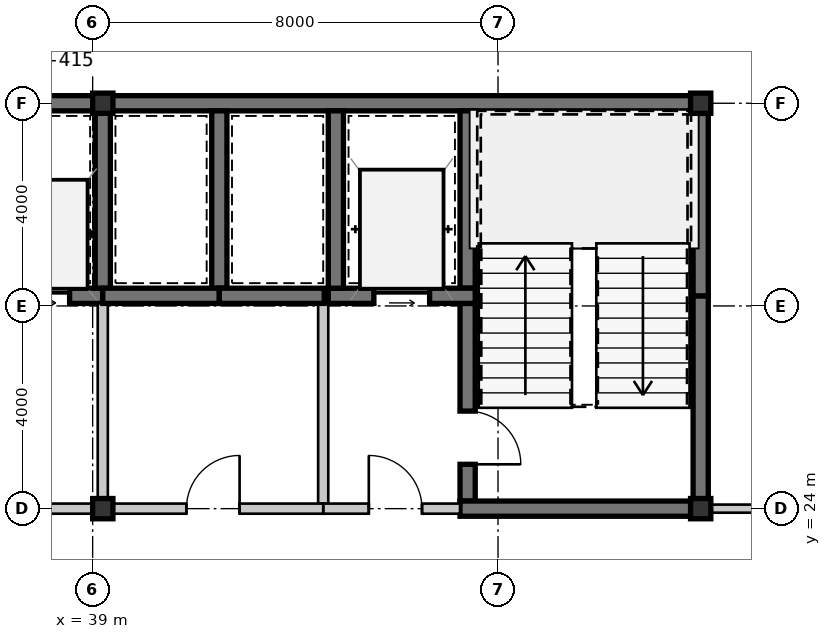
"""IFC4 building model, lengths in metres.
Left out: names, types, materials, properties, quantities, classifications, styles, units other than length and angle.
Written with IfcOpenShell. Run it as: python <this file> out.ifc"""

import sys

from ifc_helpers import new_model, si_unit, direction, frame, frame_2d, origin, origin_2d, place, context, subcontext, project, spatial, rectangle, hollow_rectangle, extrude, source, transform, mapped, element, fill, save


model = new_model("IFC4")
c1 = context("Model", 3, precision=1e-05, world=origin(), true_north=direction((0.0, 1.0)))
c2 = subcontext(c1, "Body", "Model", "MODEL_VIEW")
j1 = project(units=[si_unit("LENGTHUNIT", "METRE"), si_unit("PLANEANGLEUNIT", "RADIAN")], contexts=[c1])
p1 = place(None, origin())
s1 = spatial("IfcSite", under=j1, at=p1, CompositionType="ELEMENT")
p2 = place(p1, origin())
s2 = spatial("IfcBuilding", under=s1, at=p2, CompositionType="ELEMENT")
p3 = place(p2, frame((0.0, 0.0, 133.0)))
s3 = spatial("IfcBuildingStorey", under=s2, at=p3, CompositionType="ELEMENT", Elevation=133.0)
m1 = source(origin(), c2, "Body", "SweptSolid", [
    extrude(hollow_rectangle(XDim=0.4, YDim=0.4, WallThickness=0.016, at=origin_2d()), origin(), (0.0, 0.0, 1.0), 3.15),
])
for number, where, z_axis, x_axis in (
    (1, (39.2, 24.0, 0.0), (0.0, 0.0, 1.0), (1.0, 0.0, 0.0)),
    (2, (51.0, 24.0, 0.0), (0.0, 0.0, 1.0), (1.0, 0.0, 0.0)),
    (3, (39.2, 32.0, 0.0), (0.0, 0.0, 1.0), (1.0, 0.0, 0.0)),
    (4, (51.0, 32.0, 0.0), (0.0, 0.0, 1.0), (1.0, 0.0, 0.0)),
):
    element("IfcColumn", number, at=place(p3, frame(where, z_axis=z_axis, x_axis=x_axis)), inside=s3, PredefinedType="COLUMN", context=c2, shape_type="MappedRepresentation", body=[
        mapped(m1, transform((0.0, 0.0, 0.0), scale=1.0)),
    ])
m2 = source(origin(), c2, "Body", "SweptSolid", [
    extrude(rectangle(XDim=11.2, YDim=0.3, at=frame_2d((5.6, 0.0))), origin(), (0.0, 0.0, 1.0), 2.93),
])
p4 = place(p3, frame((28.0, 32.0, 0.0), z_axis=(0.0, 0.0, 1.0), x_axis=(1.0, 0.0, 0.0)))
e5 = element("IfcWall", 5, at=p4, inside=s3, PredefinedType="SHEAR", context=c2, shape_type="MappedRepresentation", body=[
    mapped(m2, transform((0.0, 0.0, 0.0), scale=1.0)),
])
m3 = source(origin(), c2, "Body", "SweptSolid", [
    extrude(rectangle(XDim=11.95, YDim=0.3, at=frame_2d((5.975, 0.0))), origin(), (0.0, 0.0, 1.0), 2.93),
])
p5 = place(p3, frame((39.2, 32.0, 0.0), z_axis=(0.0, 0.0, 1.0), x_axis=(1.0, 0.0, 0.0)))
e6 = element("IfcWall", 6, at=p5, inside=s3, PredefinedType="SHEAR", context=c2, shape_type="MappedRepresentation", body=[
    mapped(m3, transform((0.0, 0.0, 0.0), scale=1.0)),
])
m4 = source(origin(), c2, "Body", "SweptSolid", [
    extrude(rectangle(XDim=4.05, YDim=0.3, at=frame_2d((2.025, 0.0))), origin(), (0.0, 0.0, 1.0), 2.93),
])
p6 = place(p3, frame((51.0, 24.15, 0.0), z_axis=(0.0, 0.0, 1.0), x_axis=(0.0, 1.0, 0.0)))
e7 = element("IfcWall", 7, at=p6, inside=s3, PredefinedType="SHEAR", context=c2, shape_type="MappedRepresentation", body=[
    mapped(m4, transform((0.0, 0.0, 0.0), scale=1.0)),
])
m5 = source(origin(), c2, "Body", "SweptSolid", [
    extrude(rectangle(XDim=3.65, YDim=0.3, at=frame_2d((1.825, 0.0))), origin(), (0.0, 0.0, 1.0), 2.93),
])
p7 = place(p3, frame((51.0, 28.2, 0.0), z_axis=(0.0, 0.0, 1.0), x_axis=(0.0, 1.0, 0.0)))
e8 = element("IfcWall", 8, at=p7, inside=s3, PredefinedType="SHEAR", context=c2, shape_type="MappedRepresentation", body=[
    mapped(m5, transform((0.0, 0.0, 0.0), scale=1.0)),
])
m6 = source(origin(), c2, "Body", "SweptSolid", [
    extrude(rectangle(XDim=3.5, YDim=0.3, at=frame_2d((1.75, 0.0))), origin(), (0.0, 0.0, 1.0), 2.93),
])
p8 = place(p3, frame((46.4, 31.85, 0.0), z_axis=(0.0, 0.0, 1.0), x_axis=(0.0, -1.0, 0.0)))
e9 = element("IfcWall", 9, at=p8, inside=s3, PredefinedType="SHEAR", context=c2, shape_type="MappedRepresentation", body=[
    mapped(m6, transform((0.0, 0.0, 0.0), scale=1.0)),
])
m7 = source(origin(), c2, "Body", "SweptSolid", [
    extrude(rectangle(XDim=3.9, YDim=0.3, at=frame_2d((1.95, 0.0))), origin(), (0.0, 0.0, 1.0), 2.93),
])
p9 = place(p3, frame((46.4, 28.05, 0.0), z_axis=(0.0, 0.0, 1.0), x_axis=(0.0, -1.0, 0.0)))
e10 = element("IfcWall", 10, at=p9, inside=s3, PredefinedType="SHEAR", context=c2, shape_type="MappedRepresentation", body=[
    mapped(m7, transform((0.0, 0.0, 0.0), scale=1.0)),
])
m8 = source(origin(), c2, "Body", "SweptSolid", [
    extrude(rectangle(XDim=1.05, YDim=2.1, at=frame_2d((0.525, 1.05))), frame((0.0, 0.16, 0.0), z_axis=(0.0, -1.0, 0.0), x_axis=(1.0, 0.0, 0.0)), (0.0, 0.0, 1.0), 0.32),
])
p10 = place(p9, frame((2.125, 0.0, 0.0)))
e11 = element("IfcOpeningElement", 11, at=p10, cuts=e10, PredefinedType="OPENING", context=c2, shape_type="MappedRepresentation", body=[
    mapped(m8, transform((0.0, 0.0, 0.0), scale=1.0)),
])
m9 = source(origin(), c2, "Body", "SweptSolid", [
    extrude(rectangle(XDim=4.9, YDim=0.3, at=frame_2d((2.45, 0.0))), origin(), (0.0, 0.0, 1.0), 2.93),
])
p11 = place(p3, frame((46.25, 24.0, 0.0), z_axis=(0.0, 0.0, 1.0), x_axis=(1.0, 0.0, 0.0)))
e12 = element("IfcWall", 12, at=p11, inside=s3, PredefinedType="SHEAR", context=c2, shape_type="MappedRepresentation", body=[
    mapped(m9, transform((0.0, 0.0, 0.0), scale=1.0)),
])
m10 = source(origin(), c2, "Body", "SweptSolid", [
    extrude(rectangle(XDim=2.9, YDim=0.3, at=frame_2d((1.45, 0.0))), origin(), (0.0, 0.0, 1.0), 2.93),
])
p12 = place(p3, frame((43.65, 28.2, 0.0), z_axis=(0.0, 0.0, 1.0), x_axis=(1.0, 0.0, 0.0)))
e13 = element("IfcWall", 13, at=p12, inside=s3, PredefinedType="SHEAR", context=c2, shape_type="MappedRepresentation", body=[
    mapped(m10, transform((0.0, 0.0, 0.0), scale=1.0)),
])
m11 = source(origin(), c2, "Body", "SweptSolid", [
    extrude(rectangle(XDim=1.1, YDim=2.15, at=frame_2d((0.55, 1.075))), frame((0.0, 0.16, 0.0), z_axis=(0.0, -1.0, 0.0), x_axis=(1.0, 0.0, 0.0)), (0.0, 0.0, 1.0), 0.32),
])
p13 = place(p12, frame((0.9, 0.0, 0.0)))
e14 = element("IfcOpeningElement", 14, at=p13, cuts=e13, PredefinedType="OPENING", context=c2, shape_type="MappedRepresentation", body=[
    mapped(m11, transform((0.0, 0.0, 0.0), scale=1.0)),
])
p14 = place(p3, frame((43.8, 31.85, 0.0), z_axis=(0.0, 0.0, 1.0), x_axis=(0.0, -1.0, 0.0)))
e15 = element("IfcWall", 15, at=p14, inside=s3, PredefinedType="SHEAR", context=c2, shape_type="MappedRepresentation", body=[
    mapped(m6, transform((0.0, 0.0, 0.0), scale=1.0)),
])
m12 = source(origin(), c2, "Body", "SweptSolid", [
    extrude(rectangle(XDim=3.95, YDim=0.2, at=frame_2d((1.975, 0.0))), origin(), (0.0, 0.0, 1.0), 2.93),
])
p15 = place(p3, frame((43.55, 28.05, 0.0), z_axis=(0.0, 0.0, 1.0), x_axis=(0.0, -1.0, 0.0)))
e16 = element("IfcWall", 16, at=p15, inside=s3, PredefinedType="SOLIDWALL", context=c2, shape_type="MappedRepresentation", body=[
    mapped(m12, transform((0.0, 0.0, 0.0), scale=1.0)),
])
m13 = source(origin(), c2, "Body", "SweptSolid", [
    extrude(rectangle(XDim=2.7, YDim=0.2, at=frame_2d((1.35, 0.0))), origin(), (0.0, 0.0, 1.0), 2.397),
])
p16 = place(p3, frame((43.55, 24.0, 0.0), z_axis=(0.0, 0.0, 1.0), x_axis=(1.0, 0.0, 0.0)))
e17 = element("IfcWall", 17, at=p16, inside=s3, PredefinedType="SOLIDWALL", context=c2, shape_type="MappedRepresentation", body=[
    mapped(m13, transform((0.0, 0.0, 0.0), scale=1.0)),
])
m14 = source(origin(), c2, "Body", "SweptSolid", [
    extrude(rectangle(XDim=1.05, YDim=2.1, at=frame_2d((0.525, 1.05))), frame((0.0, 0.11, 0.0), z_axis=(0.0, -1.0, 0.0), x_axis=(1.0, 0.0, 0.0)), (0.0, 0.0, 1.0), 0.22),
])
p17 = place(p16, frame((0.9, 0.0, 0.0)))
e18 = element("IfcOpeningElement", 18, at=p17, cuts=e17, PredefinedType="OPENING", context=c2, shape_type="MappedRepresentation", body=[
    mapped(m14, transform((0.0, 0.0, 0.0), scale=1.0)),
])
m15 = source(origin(), c2, "Body", "SweptSolid", [
    extrude(rectangle(XDim=2.5, YDim=0.3, at=frame_2d((1.25, 0.0))), origin(), (0.0, 0.0, 1.0), 2.93),
])
p18 = place(p3, frame((36.7, 28.2, 0.0), z_axis=(0.0, 0.0, 1.0), x_axis=(1.0, 0.0, 0.0)))
e19 = element("IfcWall", 19, at=p18, inside=s3, PredefinedType="SHEAR", context=c2, shape_type="MappedRepresentation", body=[
    mapped(m15, transform((0.0, 0.0, 0.0), scale=1.0)),
])
m16 = source(origin(), c2, "Body", "SweptSolid", [
    extrude(rectangle(XDim=1.05, YDim=2.15, at=frame_2d((0.525, 1.075))), frame((0.0, 0.16, 0.0), z_axis=(0.0, -1.0, 0.0), x_axis=(1.0, 0.0, 0.0)), (0.0, 0.0, 1.0), 0.32),
])
p19 = place(p18, frame((0.795, 0.0, 0.0)))
e20 = element("IfcOpeningElement", 20, at=p19, cuts=e19, PredefinedType="OPENING", context=c2, shape_type="MappedRepresentation", body=[
    mapped(m16, transform((0.0, 0.0, 0.0), scale=1.0)),
])
p20 = place(p3, frame((39.2, 28.35, 0.0), z_axis=(0.0, 0.0, 1.0), x_axis=(0.0, 1.0, 0.0)))
e21 = element("IfcWall", 21, at=p20, inside=s3, PredefinedType="SHEAR", context=c2, shape_type="MappedRepresentation", body=[
    mapped(m6, transform((0.0, 0.0, 0.0), scale=1.0)),
])
m17 = source(origin(), c2, "Body", "SweptSolid", [
    extrude(rectangle(XDim=3.95, YDim=0.2, at=frame_2d((1.975, 0.0))), origin(), (0.0, 0.0, 1.0), 2.47),
])
p21 = place(p3, frame((39.2, 28.05, 0.0), z_axis=(0.0, 0.0, 1.0), x_axis=(0.0, -1.0, 0.0)))
e22 = element("IfcWall", 22, at=p21, inside=s3, PredefinedType="SOLIDWALL", context=c2, shape_type="MappedRepresentation", body=[
    mapped(m17, transform((0.0, 0.0, 0.0), scale=1.0)),
])
m18 = source(origin(), c2, "Body", "SweptSolid", [
    extrude(rectangle(XDim=6.35, YDim=0.2, at=frame_2d((3.175, 0.0))), origin(), (0.0, 0.0, 1.0), 2.47),
])
p22 = place(p3, frame((39.2, 24.0, 0.0), z_axis=(0.0, 0.0, 1.0), x_axis=(-1.0, 0.0, 0.0)))
e23 = element("IfcWall", 23, at=p22, inside=s3, PredefinedType="SOLIDWALL", context=c2, shape_type="MappedRepresentation", body=[
    mapped(m18, transform((0.0, 0.0, 0.0), scale=1.0)),
])
p23 = place(p22, frame((2.65, 0.0, 0.0)))
e24 = element("IfcOpeningElement", 24, at=p23, cuts=e23, PredefinedType="OPENING", context=c2, shape_type="MappedRepresentation", body=[
    mapped(m14, transform((0.0, 0.0, 0.0), scale=1.0)),
])
p24 = place(p3, frame((41.5, 28.35, 0.0), z_axis=(0.0, 0.0, 1.0), x_axis=(0.0, 1.0, 0.0)))
e25 = element("IfcWall", 25, at=p24, inside=s3, PredefinedType="SHEAR", context=c2, shape_type="MappedRepresentation", body=[
    mapped(m6, transform((0.0, 0.0, 0.0), scale=1.0)),
])
m19 = source(origin(), c2, "Body", "SweptSolid", [
    extrude(rectangle(XDim=2.3, YDim=0.3, at=frame_2d((1.15, 0.0))), origin(), (0.0, 0.0, 1.0), 2.93),
])
p25 = place(p3, frame((39.2, 28.2, 0.0), z_axis=(0.0, 0.0, 1.0), x_axis=(1.0, 0.0, 0.0)))
e26 = element("IfcWall", 26, at=p25, inside=s3, PredefinedType="SHEAR", context=c2, shape_type="MappedRepresentation", body=[
    mapped(m19, transform((0.0, 0.0, 0.0), scale=1.0)),
])
m20 = source(origin(), c2, "Body", "SweptSolid", [
    extrude(rectangle(XDim=2.07, YDim=0.3, at=frame_2d((1.035, 0.0))), origin(), (0.0, 0.0, 1.0), 2.93),
])
p26 = place(p3, frame((41.5, 28.2, 0.0), z_axis=(0.0, 0.0, 1.0), x_axis=(1.0, 0.0, 0.0)))
e27 = element("IfcWall", 27, at=p26, inside=s3, PredefinedType="SHEAR", context=c2, shape_type="MappedRepresentation", body=[
    mapped(m20, transform((0.0, 0.0, 0.0), scale=1.0)),
])
m21 = source(origin(), c2, "Body", "SweptSolid", [
    extrude(rectangle(XDim=4.35, YDim=0.2, at=frame_2d((2.175, 0.0))), origin(), (0.0, 0.0, 1.0), 2.397),
])
p27 = place(p3, frame((43.55, 24.0, 0.0), z_axis=(0.0, 0.0, 1.0), x_axis=(-1.0, 0.0, 0.0)))
e28 = element("IfcWall", 28, at=p27, inside=s3, PredefinedType="SOLIDWALL", context=c2, shape_type="MappedRepresentation", body=[
    mapped(m21, transform((0.0, 0.0, 0.0), scale=1.0)),
])
p28 = place(p27, frame((1.65, 0.0, 0.0)))
e29 = element("IfcOpeningElement", 29, at=p28, cuts=e28, PredefinedType="OPENING", context=c2, shape_type="MappedRepresentation", body=[
    mapped(m14, transform((0.0, 0.0, 0.0), scale=1.0)),
])
m22 = source(origin(), c2, "Body", "SweptSolid", [
    extrude(rectangle(XDim=10.1, YDim=0.16, at=frame_2d((5.05, 0.0))), origin(), (0.0, 0.0, 1.0), 2.93),
])
p29 = place(p3, frame((51.15, 24.0, 0.0), z_axis=(0.0, 0.0, 1.0), x_axis=(1.0, 0.0, 0.0)))
e30 = element("IfcWall", 30, at=p29, inside=s3, PredefinedType="PARTITIONING", context=c2, shape_type="MappedRepresentation", body=[
    mapped(m22, transform((0.0, 0.0, 0.0), scale=1.0)),
])
m23 = source(origin(), c2, "Body", "SweptSolid", [
    extrude(rectangle(XDim=0.92, YDim=2.1, at=frame_2d((0.46, 1.05))), frame((0.0, 0.09, 0.0), z_axis=(0.0, -1.0, 0.0), x_axis=(1.0, 0.0, 0.0)), (0.0, 0.0, 1.0), 0.18),
])
p30 = place(p29, frame((4.525, 0.0, 0.0)))
e31 = element("IfcOpeningElement", 31, at=p30, cuts=e30, PredefinedType="OPENING", context=c2, shape_type="MappedRepresentation", body=[
    mapped(m23, transform((0.0, 0.0, 0.0), scale=1.0)),
])
m24 = source(origin(), c2, "Body", "SweptSolid", [
    extrude(rectangle(XDim=1.05, YDim=2.1, at=frame_2d((0.525, 1.05))), frame((0.0, 0.025, 0.0), z_axis=(0.0, -1.0, 0.0), x_axis=(1.0, 0.0, 0.0)), (0.0, 0.0, 1.0), 0.05),
])
p31 = place(p10, origin())
e32 = element("IfcDoor", 32, at=p31, inside=s3, OperationType="SINGLE_SWING_RIGHT", PredefinedType="DOOR", context=c2, shape_type="MappedRepresentation", body=[
    mapped(m24, transform((0.0, 0.0, 0.0), scale=1.0)),
])
fill(e11, e32)
m25 = source(origin(), c2, "Body", "SweptSolid", [
    extrude(rectangle(XDim=1.1, YDim=2.15, at=frame_2d((0.55, 1.075))), frame((0.0, 0.025, 0.0), z_axis=(0.0, -1.0, 0.0), x_axis=(1.0, 0.0, 0.0)), (0.0, 0.0, 1.0), 0.05),
])
p32 = place(p13, origin())
e33 = element("IfcDoor", 33, at=p32, inside=s3, OperationType="SLIDING_TO_LEFT", PredefinedType="DOOR", context=c2, shape_type="MappedRepresentation", body=[
    mapped(m25, transform((0.0, 0.0, 0.0), scale=1.0)),
])
fill(e14, e33)
p33 = place(p17, origin())
e34 = element("IfcDoor", 34, at=p33, inside=s3, OperationType="SINGLE_SWING_LEFT", PredefinedType="DOOR", context=c2, shape_type="MappedRepresentation", body=[
    mapped(m24, transform((0.0, 0.0, 0.0), scale=1.0)),
])
fill(e18, e34)
m26 = source(origin(), c2, "Body", "SweptSolid", [
    extrude(rectangle(XDim=1.05, YDim=2.15, at=frame_2d((0.525, 1.075))), frame((0.0, 0.025, 0.0), z_axis=(0.0, -1.0, 0.0), x_axis=(1.0, 0.0, 0.0)), (0.0, 0.0, 1.0), 0.05),
])
p34 = place(p19, origin())
e35 = element("IfcDoor", 35, at=p34, inside=s3, OperationType="SLIDING_TO_LEFT", PredefinedType="DOOR", context=c2, shape_type="MappedRepresentation", body=[
    mapped(m26, transform((0.0, 0.0, 0.0), scale=1.0)),
])
fill(e20, e35)
p35 = place(p28, frame((1.05, 0.0, 0.0), z_axis=(0.0, 0.0, 1.0), x_axis=(-1.0, 0.0, 0.0)))
e36 = element("IfcDoor", 36, at=p35, inside=s3, OperationType="SINGLE_SWING_RIGHT", PredefinedType="DOOR", context=c2, shape_type="MappedRepresentation", body=[
    mapped(m24, transform((0.0, 0.0, 0.0), scale=1.0)),
])
fill(e29, e36)
save(model, sys.argv[1])
